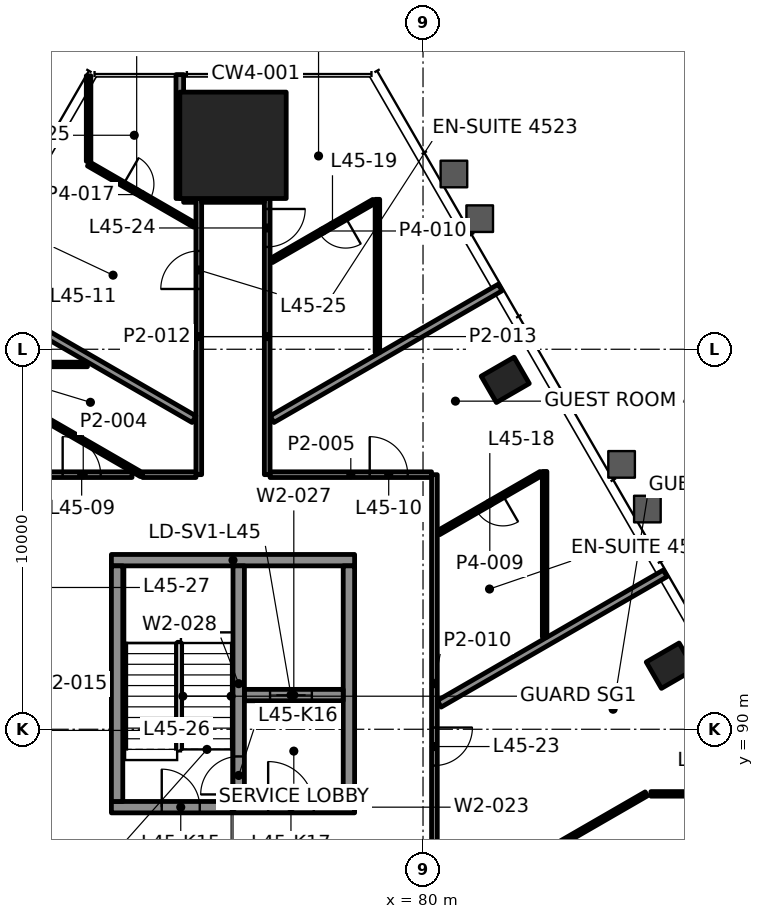
"""IFC4 building model, lengths in metres.
Left out: names, types, materials, properties, quantities, classifications, styles, units other than length and angle.
Written with IfcOpenShell. Run it as: python <this file> out.ifc"""

import sys

from ifc_helpers import new_model, si_unit, direction, frame, frame_2d, origin, origin_2d, place, context, subcontext, project, spatial, rectangle, hollow_rectangle, extrude, element, fill, save


model = new_model("IFC4")
c1 = context("Model", 3, precision=1e-05, world=origin(), true_north=direction((0.0, 1.0)))
c2 = subcontext(c1, "Body", "Model", "MODEL_VIEW")
j1 = project(units=[si_unit("LENGTHUNIT", "METRE"), si_unit("PLANEANGLEUNIT", "RADIAN")], contexts=[c1])
p1 = place(None, origin())
s1 = spatial("IfcSite", under=j1, at=p1, CompositionType="ELEMENT")
p2 = place(p1, origin())
s2 = spatial("IfcBuilding", under=s1, at=p2, CompositionType="ELEMENT")
p3 = place(p2, frame((0.0, 0.0, 194.8)))
s3 = spatial("IfcBuildingStorey", under=s2, at=p3, CompositionType="ELEMENT", Elevation=194.8)
p4 = place(p3, frame((75.0, 105.367, 0.0), z_axis=(0.0, 0.0, 1.0), x_axis=(-1.0, 0.0, 0.0)))
e1 = element("IfcColumn", 1, at=p4, inside=s3, PredefinedType="COLUMN", context=c2, shape_type="SweptSolid", body=[
    extrude(rectangle(XDim=2.8, YDim=2.8, at=origin_2d()), origin(), (0.0, 0.0, 1.0), 3.9),
])
for number, where, z_axis, x_axis in (
    (2, (86.506, 91.673, -0.0), (0.0, 0.0, 1.0), (-0.5, 0.866, 0.0)),
    (3, (82.164, 99.195, -0.0), (0.0, 0.0, 1.0), (-0.5, 0.866, 0.0)),
):
    element("IfcColumn", number, at=place(p3, frame(where, z_axis=z_axis, x_axis=x_axis)), inside=s3, PredefinedType="COLUMN", context=c2, shape_type="SweptSolid", body=[
        extrude(hollow_rectangle(XDim=0.8, YDim=1.0, WallThickness=0.05, at=origin_2d()), origin(), (0.0, 0.0, 1.0), 3.9),
    ])
p5 = place(p3, frame((71.8, 87.95, 0.0), z_axis=(0.0, 0.0, 1.0), x_axis=(1.0, 0.0, 0.0)))
e4 = element("IfcWall", 4, at=p5, inside=s3, PredefinedType="SHEAR", context=c2, shape_type="SweptSolid", body=[
    extrude(rectangle(XDim=6.4, YDim=0.3, at=frame_2d((3.2, 0.0))), origin(), (0.0, 0.0, 1.0), 3.7),
])
p6 = place(p5, frame((1.325, 0.0, 0.0)))
e5 = element("IfcOpeningElement", 5, at=p6, cuts=e4, PredefinedType="OPENING", context=c2, shape_type="SweptSolid", body=[
    extrude(rectangle(XDim=1.0, YDim=2.1, at=frame_2d((0.5, 1.05))), frame((0.0, 0.16, 0.0), z_axis=(0.0, -1.0, 0.0), x_axis=(1.0, 0.0, 0.0)), (0.0, 0.0, 1.0), 0.32),
])
p7 = place(p5, frame((4.125, 0.0, 0.0)))
e6 = element("IfcOpeningElement", 6, at=p7, cuts=e4, PredefinedType="OPENING", context=c2, shape_type="SweptSolid", body=[
    extrude(rectangle(XDim=1.2, YDim=2.1, at=frame_2d((0.6, 1.05))), frame((0.0, 0.16, 0.0), z_axis=(0.0, -1.0, 0.0), x_axis=(1.0, 0.0, 0.0)), (0.0, 0.0, 1.0), 0.32),
])
p8 = place(p3, frame((71.8, 94.45, 0.0), z_axis=(0.0, 0.0, 1.0), x_axis=(1.0, 0.0, 0.0)))
e7 = element("IfcWall", 7, at=p8, inside=s3, PredefinedType="SHEAR", context=c2, shape_type="SweptSolid", body=[
    extrude(rectangle(XDim=6.4, YDim=0.3, at=frame_2d((3.2, 0.0))), origin(), (0.0, 0.0, 1.0), 3.7),
])
for number, where, z_axis, x_axis in (
    (8, (71.95, 88.1, 0.0), (0.0, 0.0, 1.0), (0.0, 1.0, 0.0)),
    (9, (78.05, 88.1, 0.0), (0.0, 0.0, 1.0), (0.0, 1.0, 0.0)),
):
    element("IfcWall", number, at=place(p3, frame(where, z_axis=z_axis, x_axis=x_axis)), inside=s3, PredefinedType="SHEAR", context=c2, shape_type="SweptSolid", body=[
        extrude(rectangle(XDim=6.2, YDim=0.3, at=frame_2d((3.1, 0.0))), origin(), (0.0, 0.0, 1.0), 3.7),
    ])
p9 = place(p3, frame((75.3, 90.9, 0.0), z_axis=(0.0, 0.0, 1.0), x_axis=(1.0, 0.0, 0.0)))
e10 = element("IfcWall", 10, at=p9, inside=s3, PredefinedType="SHEAR", context=c2, shape_type="SweptSolid", body=[
    extrude(rectangle(XDim=2.6, YDim=0.3, at=frame_2d((1.3, 0.0))), origin(), (0.0, 0.0, 1.0), 3.7),
])
p10 = place(p9, frame((0.675, 0.0, 0.0)))
e11 = element("IfcOpeningElement", 11, at=p10, cuts=e10, PredefinedType="OPENING", context=c2, shape_type="SweptSolid", body=[
    extrude(rectangle(XDim=1.1, YDim=2.1, at=frame_2d((0.55, 1.05))), frame((0.0, 0.16, 0.0), z_axis=(0.0, -1.0, 0.0), x_axis=(1.0, 0.0, 0.0)), (0.0, 0.0, 1.0), 0.32),
])
p11 = place(p3, frame((75.15, 88.1, 0.0), z_axis=(0.0, 0.0, 1.0), x_axis=(0.0, 1.0, 0.0)))
e12 = element("IfcWall", 12, at=p11, inside=s3, PredefinedType="SHEAR", context=c2, shape_type="SweptSolid", body=[
    extrude(rectangle(XDim=6.2, YDim=0.3, at=frame_2d((3.1, 0.0))), origin(), (0.0, 0.0, 1.0), 3.7),
])
p12 = place(p11, frame((0.185, 0.0, 0.0)))
e13 = element("IfcOpeningElement", 13, at=p12, cuts=e12, PredefinedType="OPENING", context=c2, shape_type="SweptSolid", body=[
    extrude(rectangle(XDim=1.0, YDim=2.1, at=frame_2d((0.5, 1.05))), frame((0.0, 0.16, 0.0), z_axis=(0.0, -1.0, 0.0), x_axis=(1.0, 0.0, 0.0)), (0.0, 0.0, 1.0), 0.32),
])
p13 = place(p3, frame((89.724, 88.3, 0.0), z_axis=(0.0, 0.0, 1.0), x_axis=(-1.0, 0.0, 0.0)))
e14 = element("IfcWall", 14, at=p13, inside=s3, PredefinedType="PARTITIONING", context=c2, shape_type="SweptSolid", body=[
    extrude(rectangle(XDim=3.728, YDim=0.12, at=frame_2d((1.864, 0.0))), origin(), (0.0, 0.0, 1.0), 3.022),
])
p14 = place(p13, frame((1.752, 0.0, 0.0)))
e15 = element("IfcOpeningElement", 15, at=p14, cuts=e14, PredefinedType="OPENING", context=c2, shape_type="SweptSolid", body=[
    extrude(rectangle(XDim=0.8, YDim=2.1, at=frame_2d((0.4, 1.05))), frame((0.0, 0.07, 0.0), z_axis=(0.0, -1.0, 0.0), x_axis=(1.0, 0.0, 0.0)), (0.0, 0.0, 1.0), 0.14),
])
p15 = place(p3, frame((69.775, 96.7, 0.0), z_axis=(0.0, 0.0, 1.0), x_axis=(1.0, 0.0, 0.0)))
e16 = element("IfcWall", 16, at=p15, inside=s3, PredefinedType="PARTITIONING", context=c2, shape_type="SweptSolid", body=[
    extrude(rectangle(XDim=2.567, YDim=0.15, at=frame_2d((1.284, 0.0))), origin(), (0.0, 0.0, 1.0), 3.1),
])
p16 = place(p15, frame((0.742, 0.0, 0.0)))
e17 = element("IfcOpeningElement", 17, at=p16, cuts=e16, PredefinedType="OPENING", context=c2, shape_type="SweptSolid", body=[
    extrude(rectangle(XDim=1.0, YDim=2.1, at=frame_2d((0.5, 1.05))), frame((0.0, 0.085, 0.0), z_axis=(0.0, -1.0, 0.0), x_axis=(1.0, 0.0, 0.0)), (0.0, 0.0, 1.0), 0.17),
])
p17 = place(p3, frame((75.975, 96.7, 0.0), z_axis=(0.0, 0.0, 1.0), x_axis=(1.0, 0.0, 0.0)))
e18 = element("IfcWall", 18, at=p17, inside=s3, PredefinedType="PARTITIONING", context=c2, shape_type="SweptSolid", body=[
    extrude(rectangle(XDim=4.25, YDim=0.15, at=frame_2d((2.125, 0.0))), origin(), (0.0, 0.0, 1.0), 3.1),
])
p18 = place(p17, frame((2.622, 0.0, 0.0)))
e19 = element("IfcOpeningElement", 19, at=p18, cuts=e18, PredefinedType="OPENING", context=c2, shape_type="SweptSolid", body=[
    extrude(rectangle(XDim=1.0, YDim=2.1, at=frame_2d((0.5, 1.05))), frame((0.0, 0.085, 0.0), z_axis=(0.0, -1.0, 0.0), x_axis=(1.0, 0.0, 0.0)), (0.0, 0.0, 1.0), 0.17),
])
p19 = place(p3, frame((71.17, 99.6, 0.0), z_axis=(0.0, 0.0, 1.0), x_axis=(-1.0, 0.0, 0.0)))
e20 = element("IfcWall", 20, at=p19, inside=s3, PredefinedType="PARTITIONING", context=c2, shape_type="SweptSolid", body=[
    extrude(rectangle(XDim=4.37, YDim=0.12, at=frame_2d((2.185, 0.0))), origin(), (0.0, 0.0, 1.0), 3.1),
])
p20 = place(p19, frame((1.218, 0.0, 0.0)))
e21 = element("IfcOpeningElement", 21, at=p20, cuts=e20, PredefinedType="OPENING", context=c2, shape_type="SweptSolid", body=[
    extrude(rectangle(XDim=0.8, YDim=2.1, at=frame_2d((0.4, 1.05))), frame((0.0, 0.07, 0.0), z_axis=(0.0, -1.0, 0.0), x_axis=(1.0, 0.0, 0.0)), (0.0, 0.0, 1.0), 0.14),
])
p21 = place(p3, frame((73.7, 103.967, 0.0), z_axis=(0.0, 0.0, 1.0), x_axis=(1.0, 0.0, 0.0)))
e22 = element("IfcWall", 22, at=p21, inside=s3, PredefinedType="PARTITIONING", context=c2, shape_type="SweptSolid", body=[
    extrude(rectangle(XDim=0.324, YDim=0.2, at=frame_2d((0.162, 0.0))), origin(), (0.0, 0.0, 1.0), 3.1),
])
p22 = place(p3, frame((80.559, 85.23, 0.0), z_axis=(0.0, 0.0, 1.0), x_axis=(0.866020046725, 0.500009278584, 0.0)))
e23 = element("IfcWall", 23, at=p22, inside=s3, PredefinedType="PARTITIONING", context=c2, shape_type="SweptSolid", body=[
    extrude(rectangle(XDim=6.14, YDim=0.12, at=frame_2d((3.07, 0.0))), origin(), (0.0, 0.0, 1.0), 3.1),
])
p23 = place(p3, frame((80.427, 90.67, 0.0), z_axis=(0.0, 0.0, 1.0), x_axis=(0.866024528585, 0.500001515888, 0.0)))
e24 = element("IfcWall", 24, at=p23, inside=s3, PredefinedType="PARTITIONING", context=c2, shape_type="SweptSolid", body=[
    extrude(rectangle(XDim=6.866, YDim=0.2, at=frame_2d((3.433, 0.0))), origin(), (0.0, 0.0, 1.0), 3.022),
])
p24 = place(p3, frame((83.105, 96.73, 0.0), z_axis=(0.0, 0.0, 1.0), x_axis=(-0.866028856698, -0.499994019331, 0.0)))
e25 = element("IfcWall", 25, at=p24, inside=s3, PredefinedType="PARTITIONING", context=c2, shape_type="SweptSolid", body=[
    extrude(rectangle(XDim=3.113, YDim=0.12, at=frame_2d((1.556, 0.0))), origin(), (0.0, 0.0, 1.0), 3.1),
])
p25 = place(p24, frame((1.156, 0.0, 0.0)))
e26 = element("IfcOpeningElement", 26, at=p25, cuts=e25, PredefinedType="OPENING", context=c2, shape_type="SweptSolid", body=[
    extrude(rectangle(XDim=0.8, YDim=2.1, at=frame_2d((0.4, 1.05))), frame((0.0, 0.07, 0.0), z_axis=(0.0, -1.0, 0.0), x_axis=(1.0, 0.0, 0.0)), (0.0, 0.0, 1.0), 0.14),
])
p26 = place(p3, frame((76.027, 98.159, 0.0), z_axis=(0.0, 0.0, 1.0), x_axis=(0.866026061359, 0.499998861046, 0.0)))
e27 = element("IfcWall", 27, at=p26, inside=s3, PredefinedType="PARTITIONING", context=c2, shape_type="SweptSolid", body=[
    extrude(rectangle(XDim=6.932, YDim=0.2, at=frame_2d((3.466, 0.0))), origin(), (0.0, 0.0, 1.0), 3.1),
])
p27 = place(p3, frame((78.706, 103.89, 0.0), z_axis=(0.0, 0.0, 1.0), x_axis=(-0.866028856698, -0.499994019331, 0.0)))
e28 = element("IfcWall", 28, at=p27, inside=s3, PredefinedType="PARTITIONING", context=c2, shape_type="SweptSolid", body=[
    extrude(rectangle(XDim=3.113, YDim=0.12, at=frame_2d((1.556, 0.0))), origin(), (0.0, 0.0, 1.0), 3.1),
])
p28 = place(p27, frame((0.856, 0.0, 0.0)))
e29 = element("IfcOpeningElement", 29, at=p28, cuts=e28, PredefinedType="OPENING", context=c2, shape_type="SweptSolid", body=[
    extrude(rectangle(XDim=0.8, YDim=2.1, at=frame_2d((0.4, 1.05))), frame((0.0, 0.07, 0.0), z_axis=(0.0, -1.0, 0.0), x_axis=(1.0, 0.0, 0.0)), (0.0, 0.0, 1.0), 0.14),
])
p29 = place(p3, frame((83.2, 92.427, 0.0), z_axis=(0.0, 0.0, 1.0), x_axis=(0.0, 1.0, 0.0)))
e30 = element("IfcWall", 30, at=p29, inside=s3, PredefinedType="PARTITIONING", context=c2, shape_type="SweptSolid", body=[
    extrude(rectangle(XDim=4.358, YDim=0.12, at=frame_2d((2.179, 0.0))), origin(), (0.0, 0.0, 1.0), 3.1),
])
p30 = place(p3, frame((80.3, 96.699, 0.0), z_axis=(0.0, 0.0, 1.0), x_axis=(0.0, -1.0, 0.0)))
e31 = element("IfcWall", 31, at=p30, inside=s3, PredefinedType="PARTITIONING", context=c2, shape_type="SweptSolid", body=[
    extrude(rectangle(XDim=10.999, YDim=0.15, at=frame_2d((5.5, 0.0))), origin(), (0.0, 0.0, 1.0), 3.097),
])
p31 = place(p30, frame((6.654, 0.0, 0.0)))
e32 = element("IfcOpeningElement", 32, at=p31, cuts=e31, PredefinedType="OPENING", context=c2, shape_type="SweptSolid", body=[
    extrude(rectangle(XDim=1.0, YDim=2.1, at=frame_2d((0.5, 1.05))), frame((0.0, 0.085, 0.0), z_axis=(0.0, -1.0, 0.0), x_axis=(1.0, 0.0, 0.0)), (0.0, 0.0, 1.0), 0.17),
])
p32 = place(p3, frame((78.8, 99.916, 0.0), z_axis=(0.0, 0.0, 1.0), x_axis=(0.0, 1.0, 0.0)))
e33 = element("IfcWall", 33, at=p32, inside=s3, PredefinedType="PARTITIONING", context=c2, shape_type="SweptSolid", body=[
    extrude(rectangle(XDim=4.03, YDim=0.12, at=frame_2d((2.015, 0.0))), origin(), (0.0, 0.0, 1.0), 3.1),
])
p33 = place(p3, frame((75.9, 103.966, 0.0), z_axis=(0.0, 0.0, 1.0), x_axis=(0.0, -1.0, 0.0)))
e34 = element("IfcWall", 34, at=p33, inside=s3, PredefinedType="PARTITIONING", context=c2, shape_type="SweptSolid", body=[
    extrude(rectangle(XDim=7.266, YDim=0.15, at=frame_2d((3.633, 0.0))), origin(), (0.0, 0.0, 1.0), 3.1),
])
p34 = place(p33, frame((0.275, 0.0, 0.0)))
e35 = element("IfcOpeningElement", 35, at=p34, cuts=e34, PredefinedType="OPENING", context=c2, shape_type="SweptSolid", body=[
    extrude(rectangle(XDim=1.0, YDim=2.1, at=frame_2d((0.5, 1.05))), frame((0.0, 0.085, 0.0), z_axis=(0.0, -1.0, 0.0), x_axis=(1.0, 0.0, 0.0)), (0.0, 0.0, 1.0), 0.17),
])
p35 = place(p3, frame((74.1, 96.7, 0.0), z_axis=(0.0, 0.0, 1.0), x_axis=(0.0, 1.0, 0.0)))
e36 = element("IfcWall", 36, at=p35, inside=s3, PredefinedType="PARTITIONING", context=c2, shape_type="SweptSolid", body=[
    extrude(rectangle(XDim=7.267, YDim=0.15, at=frame_2d((3.633, 0.0))), origin(), (0.0, 0.0, 1.0), 3.1),
])
p36 = place(p35, frame((4.886, 0.0, 0.0)))
e37 = element("IfcOpeningElement", 37, at=p36, cuts=e36, PredefinedType="OPENING", context=c2, shape_type="SweptSolid", body=[
    extrude(rectangle(XDim=1.0, YDim=2.1, at=frame_2d((0.5, 1.05))), frame((0.0, 0.085, 0.0), z_axis=(0.0, -1.0, 0.0), x_axis=(1.0, 0.0, 0.0)), (0.0, 0.0, 1.0), 0.17),
])
p37 = place(p3, frame((73.6, 103.967, 0.0), z_axis=(0.0, 0.0, 1.0), x_axis=(0.0, 1.0, 0.0)))
e38 = element("IfcWall", 38, at=p37, inside=s3, PredefinedType="PARTITIONING", context=c2, shape_type="SweptSolid", body=[
    extrude(rectangle(XDim=3.26, YDim=0.2, at=frame_2d((1.63, 0.0))), origin(), (0.0, 0.0, 1.0), 3.1),
])
p38 = place(p3, frame((71.2, 104.945, 0.0), z_axis=(0.0, 0.0, 1.0), x_axis=(0.0, 1.0, 0.0)))
e39 = element("IfcWall", 39, at=p38, inside=s3, PredefinedType="PARTITIONING", context=c2, shape_type="SweptSolid", body=[
    extrude(rectangle(XDim=2.252, YDim=0.12, at=frame_2d((1.126, 0.0))), origin(), (0.0, 0.0, 1.0), 3.1),
])
p39 = place(p3, frame((71.2, 104.876, 0.0), z_axis=(0.0, 0.0, 1.0), x_axis=(0.866029130051, -0.499993545862, 0.0)))
e40 = element("IfcWall", 40, at=p39, inside=s3, PredefinedType="PARTITIONING", context=c2, shape_type="SweptSolid", body=[
    extrude(rectangle(XDim=3.222, YDim=0.12, at=frame_2d((1.611, 0.0))), origin(), (0.0, 0.0, 1.0), 3.1),
])
p40 = place(p39, frame((1.061, 0.0, 0.0)))
e41 = element("IfcOpeningElement", 41, at=p40, cuts=e40, PredefinedType="OPENING", context=c2, shape_type="SweptSolid", body=[
    extrude(rectangle(XDim=0.8, YDim=2.1, at=frame_2d((0.4, 1.05))), frame((0.0, 0.07, 0.0), z_axis=(0.0, -1.0, 0.0), x_axis=(1.0, 0.0, 0.0)), (0.0, 0.0, 1.0), 0.14),
])
p41 = place(p3, frame((73.973, 98.159, 0.0), z_axis=(0.0, 0.0, 1.0), x_axis=(-0.866026061359, 0.499998861046, 0.0)))
e42 = element("IfcWall", 42, at=p41, inside=s3, PredefinedType="PARTITIONING", context=c2, shape_type="SweptSolid", body=[
    extrude(rectangle(XDim=6.932, YDim=0.2, at=frame_2d((3.466, 0.0))), origin(), (0.0, 0.0, 1.0), 3.1),
])
p42 = place(p3, frame((72.592, 96.7, 0.0), z_axis=(0.0, 0.0, 1.0), x_axis=(-0.866036013313, 0.499981623307, 0.0)))
e43 = element("IfcWall", 43, at=p42, inside=s3, PredefinedType="PARTITIONING", context=c2, shape_type="SweptSolid", body=[
    extrude(rectangle(XDim=4.865, YDim=0.12, at=frame_2d((2.433, 0.0))), origin(), (0.0, 0.0, 1.0), 3.1),
])
p43 = place(p3, frame((72.622, 96.7, 0.0), z_axis=(0.0, 0.0, 1.0), x_axis=(1.0, 0.0, 0.0)))
e44 = element("IfcWall", 44, at=p43, inside=s3, PredefinedType="PARTITIONING", context=c2, shape_type="SweptSolid", body=[
    extrude(rectangle(XDim=1.403, YDim=0.15, at=frame_2d((0.701, 0.0))), origin(), (0.0, 0.0, 1.0), 3.1),
])
p44 = place(p3, frame((74.175, 103.967, 0.0), z_axis=(0.0, 0.0, 1.0), x_axis=(1.0, 0.0, 0.0)))
e45 = element("IfcWall", 45, at=p44, inside=s3, PredefinedType="PARTITIONING", context=c2, shape_type="SweptSolid", body=[
    extrude(rectangle(XDim=1.649, YDim=0.2, at=frame_2d((0.825, 0.0))), origin(), (0.0, 0.0, 1.0), 3.097),
])
p45 = place(p16, origin())
e46 = element("IfcDoor", 46, at=p45, inside=s3, OperationType="SINGLE_SWING_LEFT", PredefinedType="DOOR", context=c2, shape_type="SweptSolid", body=[
    extrude(rectangle(XDim=1.0, YDim=2.1, at=frame_2d((0.5, 1.05))), frame((0.0, 0.025, 0.0), z_axis=(0.0, -1.0, 0.0), x_axis=(1.0, 0.0, 0.0)), (0.0, 0.0, 1.0), 0.05),
])
fill(e17, e46)
p46 = place(p18, origin())
e47 = element("IfcDoor", 47, at=p46, inside=s3, OperationType="SINGLE_SWING_LEFT", PredefinedType="DOOR", context=c2, shape_type="SweptSolid", body=[
    extrude(rectangle(XDim=1.0, YDim=2.1, at=frame_2d((0.5, 1.05))), frame((0.0, 0.025, 0.0), z_axis=(0.0, -1.0, 0.0), x_axis=(1.0, 0.0, 0.0)), (0.0, 0.0, 1.0), 0.05),
])
fill(e19, e47)
p47 = place(p25, origin())
e48 = element("IfcDoor", 48, at=p47, inside=s3, OperationType="SINGLE_SWING_LEFT", PredefinedType="DOOR", context=c2, shape_type="SweptSolid", body=[
    extrude(rectangle(XDim=0.8, YDim=2.1, at=frame_2d((0.4, 1.05))), frame((0.0, 0.025, 0.0), z_axis=(0.0, -1.0, 0.0), x_axis=(1.0, 0.0, 0.0)), (0.0, 0.0, 1.0), 0.05),
])
fill(e26, e48)
p48 = place(p28, origin())
e49 = element("IfcDoor", 49, at=p48, inside=s3, OperationType="SINGLE_SWING_LEFT", PredefinedType="DOOR", context=c2, shape_type="SweptSolid", body=[
    extrude(rectangle(XDim=0.8, YDim=2.1, at=frame_2d((0.4, 1.05))), frame((0.0, 0.025, 0.0), z_axis=(0.0, -1.0, 0.0), x_axis=(1.0, 0.0, 0.0)), (0.0, 0.0, 1.0), 0.05),
])
fill(e29, e49)
p49 = place(p31, origin())
e50 = element("IfcDoor", 50, at=p49, inside=s3, OperationType="SINGLE_SWING_RIGHT", PredefinedType="DOOR", context=c2, shape_type="SweptSolid", body=[
    extrude(rectangle(XDim=1.0, YDim=2.1, at=frame_2d((0.5, 1.05))), frame((0.0, 0.025, 0.0), z_axis=(0.0, -1.0, 0.0), x_axis=(1.0, 0.0, 0.0)), (0.0, 0.0, 1.0), 0.05),
])
fill(e32, e50)
p50 = place(p34, origin())
e51 = element("IfcDoor", 51, at=p50, inside=s3, OperationType="SINGLE_SWING_RIGHT", PredefinedType="DOOR", context=c2, shape_type="SweptSolid", body=[
    extrude(rectangle(XDim=1.0, YDim=2.1, at=frame_2d((0.5, 1.05))), frame((0.0, 0.025, 0.0), z_axis=(0.0, -1.0, 0.0), x_axis=(1.0, 0.0, 0.0)), (0.0, 0.0, 1.0), 0.05),
])
fill(e35, e51)
p51 = place(p36, origin())
e52 = element("IfcDoor", 52, at=p51, inside=s3, OperationType="SINGLE_SWING_LEFT", PredefinedType="DOOR", context=c2, shape_type="SweptSolid", body=[
    extrude(rectangle(XDim=1.0, YDim=2.1, at=frame_2d((0.5, 1.05))), frame((0.0, 0.025, 0.0), z_axis=(0.0, -1.0, 0.0), x_axis=(1.0, 0.0, 0.0)), (0.0, 0.0, 1.0), 0.05),
])
fill(e37, e52)
p52 = place(p40, origin())
e53 = element("IfcDoor", 53, at=p52, inside=s3, OperationType="SINGLE_SWING_LEFT", PredefinedType="DOOR", context=c2, shape_type="SweptSolid", body=[
    extrude(rectangle(XDim=0.8, YDim=2.1, at=frame_2d((0.4, 1.05))), frame((0.0, 0.025, 0.0), z_axis=(0.0, -1.0, 0.0), x_axis=(1.0, 0.0, 0.0)), (0.0, 0.0, 1.0), 0.05),
])
fill(e41, e53)
p53 = place(p10, origin())
e54 = element("IfcDoor", 54, at=p53, inside=s3, OperationType="DOUBLE_DOOR_SLIDING", PredefinedType="DOOR", context=c2, shape_type="SweptSolid", body=[
    extrude(rectangle(XDim=1.1, YDim=2.1, at=frame_2d((0.55, 1.05))), frame((0.0, 0.025, 0.0), z_axis=(0.0, -1.0, 0.0), x_axis=(1.0, 0.0, 0.0)), (0.0, 0.0, 1.0), 0.05),
])
fill(e11, e54)
p54 = place(p6, origin())
e55 = element("IfcDoor", 55, at=p54, inside=s3, OperationType="SINGLE_SWING_RIGHT", PredefinedType="DOOR", context=c2, shape_type="SweptSolid", body=[
    extrude(rectangle(XDim=1.0, YDim=2.1, at=frame_2d((0.5, 1.05))), frame((0.0, 0.025, 0.0), z_axis=(0.0, -1.0, 0.0), x_axis=(1.0, 0.0, 0.0)), (0.0, 0.0, 1.0), 0.05),
])
fill(e5, e55)
p55 = place(p12, origin())
e56 = element("IfcDoor", 56, at=p55, inside=s3, OperationType="SINGLE_SWING_LEFT", PredefinedType="DOOR", context=c2, shape_type="SweptSolid", body=[
    extrude(rectangle(XDim=1.0, YDim=2.1, at=frame_2d((0.5, 1.05))), frame((0.0, 0.025, 0.0), z_axis=(0.0, -1.0, 0.0), x_axis=(1.0, 0.0, 0.0)), (0.0, 0.0, 1.0), 0.05),
])
fill(e13, e56)
p56 = place(p7, origin())
e57 = element("IfcDoor", 57, at=p56, inside=s3, OperationType="SINGLE_SWING_RIGHT", PredefinedType="DOOR", context=c2, shape_type="SweptSolid", body=[
    extrude(rectangle(XDim=1.2, YDim=2.1, at=frame_2d((0.6, 1.05))), frame((0.0, 0.025, 0.0), z_axis=(0.0, -1.0, 0.0), x_axis=(1.0, 0.0, 0.0)), (0.0, 0.0, 1.0), 0.05),
])
fill(e6, e57)
save(model, sys.argv[1])
